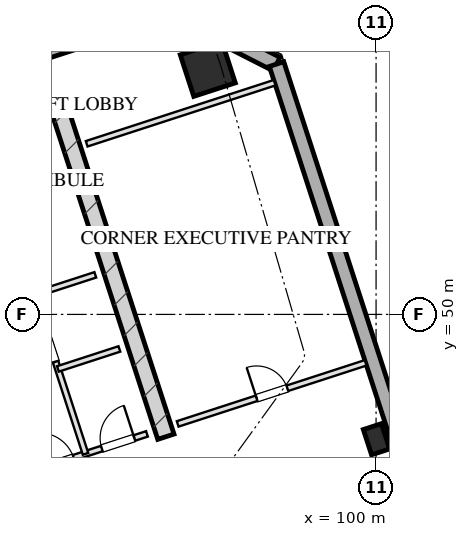
"""IFC4 building model, lengths in metres.
Left out: names, types, materials, properties, quantities, classifications, styles, units other than length and angle.
Written with IfcOpenShell. Run it as: python <this file> out.ifc"""

import sys

from ifc_helpers import new_model, si_unit, direction, frame, frame_2d, origin, origin_2d, place, context, subcontext, project, spatial, rectangle, hollow_rectangle, extrude, element, fill, save


model = new_model("IFC4")
c1 = context("Model", 3, precision=1e-05, world=origin(), true_north=direction((0.0, 1.0)))
c2 = subcontext(c1, "Body", "Model", "MODEL_VIEW")
j1 = project(units=[si_unit("LENGTHUNIT", "METRE"), si_unit("PLANEANGLEUNIT", "RADIAN")], contexts=[c1])
p1 = place(None, origin())
s1 = spatial("IfcSite", under=j1, at=p1, CompositionType="ELEMENT")
p2 = place(p1, origin())
s2 = spatial("IfcBuilding", under=s1, at=p2, CompositionType="ELEMENT")
p3 = place(p2, frame((0.0, 0.0, 223.1)))
s3 = spatial("IfcBuildingStorey", under=s2, at=p3, CompositionType="ELEMENT", Elevation=223.1)
p4 = place(p3, frame((76.415, 50.489, 0.0), z_axis=(0.0, 0.0, 1.0), x_axis=(0.951056810414, 0.309016089169, 0.0)))
e1 = element("IfcWall", 1, at=p4, inside=s3, PredefinedType="SHEAR", context=c2, shape_type="SweptSolid", body=[
    extrude(rectangle(XDim=16.25, YDim=0.45, at=frame_2d((8.125, 0.0))), origin(), (0.0, 0.0, 1.0), 3.45),
])
p5 = place(p3, frame((94.469, 46.781, 0.0), z_axis=(0.0, 0.0, 1.0), x_axis=(-0.309004419953, 0.951060601881, 0.0)))
e2 = element("IfcWall", 2, at=p5, inside=s3, PredefinedType="SHEAR", context=c2, shape_type="SweptSolid", body=[
    extrude(rectangle(XDim=9.33, YDim=0.45, at=frame_2d((4.665, 0.0))), origin(), (0.0, 0.0, 1.0), 3.45),
])
p6 = place(p3, frame((95.572, 56.461, 0.0), z_axis=(0.0, 0.0, 1.0), x_axis=(0.951056516295, 0.309016994375, 0.0)))
e3 = element("IfcColumn", 3, at=p6, inside=s3, PredefinedType="COLUMN", context=c2, shape_type="SweptSolid", body=[
    extrude(hollow_rectangle(XDim=1.15, YDim=1.15, WallThickness=0.04, at=origin_2d()), origin(), (0.0, 0.0, 1.0), 3.451),
])
p7 = place(p3, frame((100.01, 46.716, 0.0), z_axis=(0.0, 0.0, 1.0), x_axis=(0.951056516295, 0.309016994375, 0.0)))
e4 = element("IfcColumn", 4, at=p7, inside=s3, PredefinedType="COLUMN", context=c2, shape_type="SweptSolid", body=[
    extrude(hollow_rectangle(XDim=0.5, YDim=0.7, WallThickness=0.025, at=origin_2d()), origin(), (0.0, 0.0, 1.0), 3.451),
])
p8 = place(p3, frame((72.165, 50.706, 0.0), z_axis=(0.0, 0.0, 1.0), x_axis=(0.951058012937, 0.309012388148, 0.0)))
e5 = element("IfcWall", 5, at=p8, inside=s3, PredefinedType="SOLIDWALL", context=c2, shape_type="SweptSolid", body=[
    extrude(rectangle(XDim=23.6, YDim=0.4, at=frame_2d((11.8, 0.0))), origin(), (0.0, 0.0, 1.0), 2.61),
])
p9 = place(p3, frame((94.61, 57.999, 0.0), z_axis=(0.0, 0.0, 1.0), x_axis=(0.890979603174, -0.454043331334, 0.0)))
e6 = element("IfcWall", 6, at=p9, inside=s3, PredefinedType="SOLIDWALL", context=c2, shape_type="SweptSolid", body=[
    extrude(rectangle(XDim=3.111, YDim=0.4, at=frame_2d((1.556, 0.0))), origin(), (0.0, 0.0, 1.0), 2.61),
])
p10 = place(p3, frame((97.382, 56.586, 0.0), z_axis=(0.0, 0.0, 1.0), x_axis=(0.309016491071, -0.951056679828, 0.0)))
e7 = element("IfcWall", 7, at=p10, inside=s3, PredefinedType="SOLIDWALL", context=c2, shape_type="SweptSolid", body=[
    extrude(rectangle(XDim=38.4, YDim=0.4, at=frame_2d((19.2, 0.0))), origin(), (0.0, 0.0, 1.0), 2.61),
])
p11 = place(p10, frame((24.55, 0.0, 0.75)))
e8 = element("IfcOpeningElement", 8, at=p11, cuts=e7, PredefinedType="OPENING", context=c2, shape_type="SweptSolid", body=[
    extrude(rectangle(XDim=2.1, YDim=1.46, at=frame_2d((1.05, 0.73))), frame((0.0, 0.21, 0.0), z_axis=(0.0, -1.0, 0.0), x_axis=(1.0, 0.0, 0.0)), (0.0, 0.0, 1.0), 0.42),
])
p12 = place(p10, frame((20.75, 0.0, 0.75)))
e9 = element("IfcOpeningElement", 9, at=p12, cuts=e7, PredefinedType="OPENING", context=c2, shape_type="SweptSolid", body=[
    extrude(rectangle(XDim=2.1, YDim=1.46, at=frame_2d((1.05, 0.73))), frame((0.0, 0.21, 0.0), z_axis=(0.0, -1.0, 0.0), x_axis=(1.0, 0.0, 0.0)), (0.0, 0.0, 1.0), 0.42),
])
p13 = place(p10, frame((15.55, 0.0, 0.75)))
e10 = element("IfcOpeningElement", 10, at=p13, cuts=e7, PredefinedType="OPENING", context=c2, shape_type="SweptSolid", body=[
    extrude(rectangle(XDim=2.1, YDim=1.46, at=frame_2d((1.05, 0.73))), frame((0.0, 0.21, 0.0), z_axis=(0.0, -1.0, 0.0), x_axis=(1.0, 0.0, 0.0)), (0.0, 0.0, 1.0), 0.42),
])
p14 = place(p10, frame((11.75, 0.0, 0.75)))
e11 = element("IfcOpeningElement", 11, at=p14, cuts=e7, PredefinedType="OPENING", context=c2, shape_type="SweptSolid", body=[
    extrude(rectangle(XDim=2.1, YDim=1.46, at=frame_2d((1.05, 0.73))), frame((0.0, 0.21, 0.0), z_axis=(0.0, -1.0, 0.0), x_axis=(1.0, 0.0, 0.0)), (0.0, 0.0, 1.0), 0.42),
])
p15 = place(p3, frame((90.928, 45.868, 0.0), z_axis=(0.0, 0.0, 1.0), x_axis=(0.951059297078, 0.309008435874, 0.0)))
e12 = element("IfcWall", 12, at=p15, inside=s3, PredefinedType="PARTITIONING", context=c2, shape_type="SweptSolid", body=[
    extrude(rectangle(XDim=3.2, YDim=0.15, at=frame_2d((1.6, 0.0))), origin(), (0.0, 0.0, 1.0), 3.175),
])
p16 = place(p15, frame((0.22, 0.0, 0.0)))
e13 = element("IfcOpeningElement", 13, at=p16, cuts=e12, PredefinedType="OPENING", context=c2, shape_type="SweptSolid", body=[
    extrude(rectangle(XDim=0.95, YDim=2.05, at=frame_2d((0.475, 1.025))), frame((0.0, 0.085, 0.0), z_axis=(0.0, -1.0, 0.0), x_axis=(1.0, 0.0, 0.0)), (0.0, 0.0, 1.0), 0.17),
])
p17 = place(p15, frame((1.95, 0.0, 0.0)))
e14 = element("IfcOpeningElement", 14, at=p17, cuts=e12, PredefinedType="OPENING", context=c2, shape_type="SweptSolid", body=[
    extrude(rectangle(XDim=0.9, YDim=2.05, at=frame_2d((0.45, 1.025))), frame((0.0, 0.085, 0.0), z_axis=(0.0, -1.0, 0.0), x_axis=(1.0, 0.0, 0.0)), (0.0, 0.0, 1.0), 0.17),
])
p18 = place(p3, frame((92.355, 46.331, 0.0), z_axis=(0.0, 0.0, 1.0), x_axis=(-0.309007490203, 0.951059604335, 0.0)))
e15 = element("IfcWall", 15, at=p18, inside=s3, PredefinedType="PARTITIONING", context=c2, shape_type="SweptSolid", body=[
    extrude(rectangle(XDim=8.43, YDim=0.15, at=frame_2d((4.215, 0.0))), origin(), (0.0, 0.0, 1.0), 3.175),
])
p19 = place(p18, frame((2.55, 0.0, 0.0)))
e16 = element("IfcOpeningElement", 16, at=p19, cuts=e15, PredefinedType="OPENING", context=c2, shape_type="SweptSolid", body=[
    extrude(rectangle(XDim=0.95, YDim=2.05, at=frame_2d((0.475, 1.025))), frame((0.0, 0.085, 0.0), z_axis=(0.0, -1.0, 0.0), x_axis=(1.0, 0.0, 0.0)), (0.0, 0.0, 1.0), 0.17),
])
p20 = place(p18, frame((5.6, 0.0, 0.0)))
e17 = element("IfcOpeningElement", 17, at=p20, cuts=e15, PredefinedType="OPENING", context=c2, shape_type="SweptSolid", body=[
    extrude(rectangle(XDim=0.9, YDim=2.05, at=frame_2d((0.45, 1.025))), frame((0.0, 0.085, 0.0), z_axis=(0.0, -1.0, 0.0), x_axis=(1.0, 0.0, 0.0)), (0.0, 0.0, 1.0), 0.17),
])
p21 = place(p3, frame((90.995, 50.516, 0.0), z_axis=(0.0, 0.0, 1.0), x_axis=(0.951040401051, 0.309066587596, 0.0)))
e18 = element("IfcWall", 18, at=p21, inside=s3, PredefinedType="PARTITIONING", context=c2, shape_type="SweptSolid", body=[
    extrude(rectangle(XDim=1.7, YDim=0.15, at=frame_2d((0.85, 0.0))), origin(), (0.0, 0.0, 1.0), 3.175),
])
p22 = place(p3, frame((91.628, 48.566, 0.0), z_axis=(0.0, 0.0, 1.0), x_axis=(0.951054116971, 0.309024378638, 0.0)))
e19 = element("IfcWall", 19, at=p22, inside=s3, PredefinedType="PARTITIONING", context=c2, shape_type="SweptSolid", body=[
    extrude(rectangle(XDim=1.7, YDim=0.15, at=frame_2d((0.85, 0.0))), origin(), (0.0, 0.0, 1.0), 3.175),
])
p23 = place(p3, frame((92.385, 54.49, 0.0), z_axis=(0.0, 0.0, 1.0), x_axis=(0.951055112834, 0.309021313752, 0.0)))
e20 = element("IfcWall", 20, at=p23, inside=s3, PredefinedType="PARTITIONING", context=c2, shape_type="SweptSolid", body=[
    extrude(rectangle(XDim=5.2, YDim=0.15, at=frame_2d((2.6, 0.0))), origin(), (0.0, 0.0, 1.0), 3.175),
])
p24 = place(p3, frame((94.78, 47.119, 0.0), z_axis=(0.0, 0.0, 1.0), x_axis=(0.951055112834, 0.309021313752, 0.0)))
e21 = element("IfcWall", 21, at=p24, inside=s3, PredefinedType="PARTITIONING", context=c2, shape_type="SweptSolid", body=[
    extrude(rectangle(XDim=5.2, YDim=0.15, at=frame_2d((2.6, 0.0))), origin(), (0.0, 0.0, 1.0), 3.175),
])
p25 = place(p24, frame((2.184, 0.0, 0.0)))
e22 = element("IfcOpeningElement", 22, at=p25, cuts=e21, PredefinedType="OPENING", context=c2, shape_type="SweptSolid", body=[
    extrude(rectangle(XDim=0.85, YDim=2.05, at=frame_2d((0.425, 1.025))), frame((0.0, 0.085, 0.0), z_axis=(0.0, -1.0, 0.0), x_axis=(1.0, 0.0, 0.0)), (0.0, 0.0, 1.0), 0.17),
])
p26 = place(p16, origin())
e23 = element("IfcDoor", 23, at=p26, inside=s3, OperationType="SINGLE_SWING_LEFT", PredefinedType="DOOR", context=c2, shape_type="SweptSolid", body=[
    extrude(rectangle(XDim=0.95, YDim=2.05, at=frame_2d((0.475, 1.025))), frame((0.0, 0.025, 0.0), z_axis=(0.0, -1.0, 0.0), x_axis=(1.0, 0.0, 0.0)), (0.0, 0.0, 1.0), 0.05),
])
fill(e13, e23)
p27 = place(p17, origin())
e24 = element("IfcDoor", 24, at=p27, inside=s3, OperationType="SINGLE_SWING_RIGHT", PredefinedType="DOOR", context=c2, shape_type="SweptSolid", body=[
    extrude(rectangle(XDim=0.9, YDim=2.05, at=frame_2d((0.45, 1.025))), frame((0.0, 0.025, 0.0), z_axis=(0.0, -1.0, 0.0), x_axis=(1.0, 0.0, 0.0)), (0.0, 0.0, 1.0), 0.05),
])
fill(e14, e24)
p28 = place(p19, origin())
e25 = element("IfcDoor", 25, at=p28, inside=s3, OperationType="SINGLE_SWING_LEFT", PredefinedType="DOOR", context=c2, shape_type="SweptSolid", body=[
    extrude(rectangle(XDim=0.95, YDim=2.05, at=frame_2d((0.475, 1.025))), frame((0.0, 0.025, 0.0), z_axis=(0.0, -1.0, 0.0), x_axis=(1.0, 0.0, 0.0)), (0.0, 0.0, 1.0), 0.05),
])
fill(e16, e25)
p29 = place(p25, origin())
e26 = element("IfcDoor", 26, at=p29, inside=s3, OperationType="SINGLE_SWING_LEFT", PredefinedType="DOOR", context=c2, shape_type="SweptSolid", body=[
    extrude(rectangle(XDim=0.85, YDim=2.05, at=frame_2d((0.425, 1.025))), frame((0.0, 0.025, 0.0), z_axis=(0.0, -1.0, 0.0), x_axis=(1.0, 0.0, 0.0)), (0.0, 0.0, 1.0), 0.05),
])
fill(e22, e26)
save(model, sys.argv[1])
